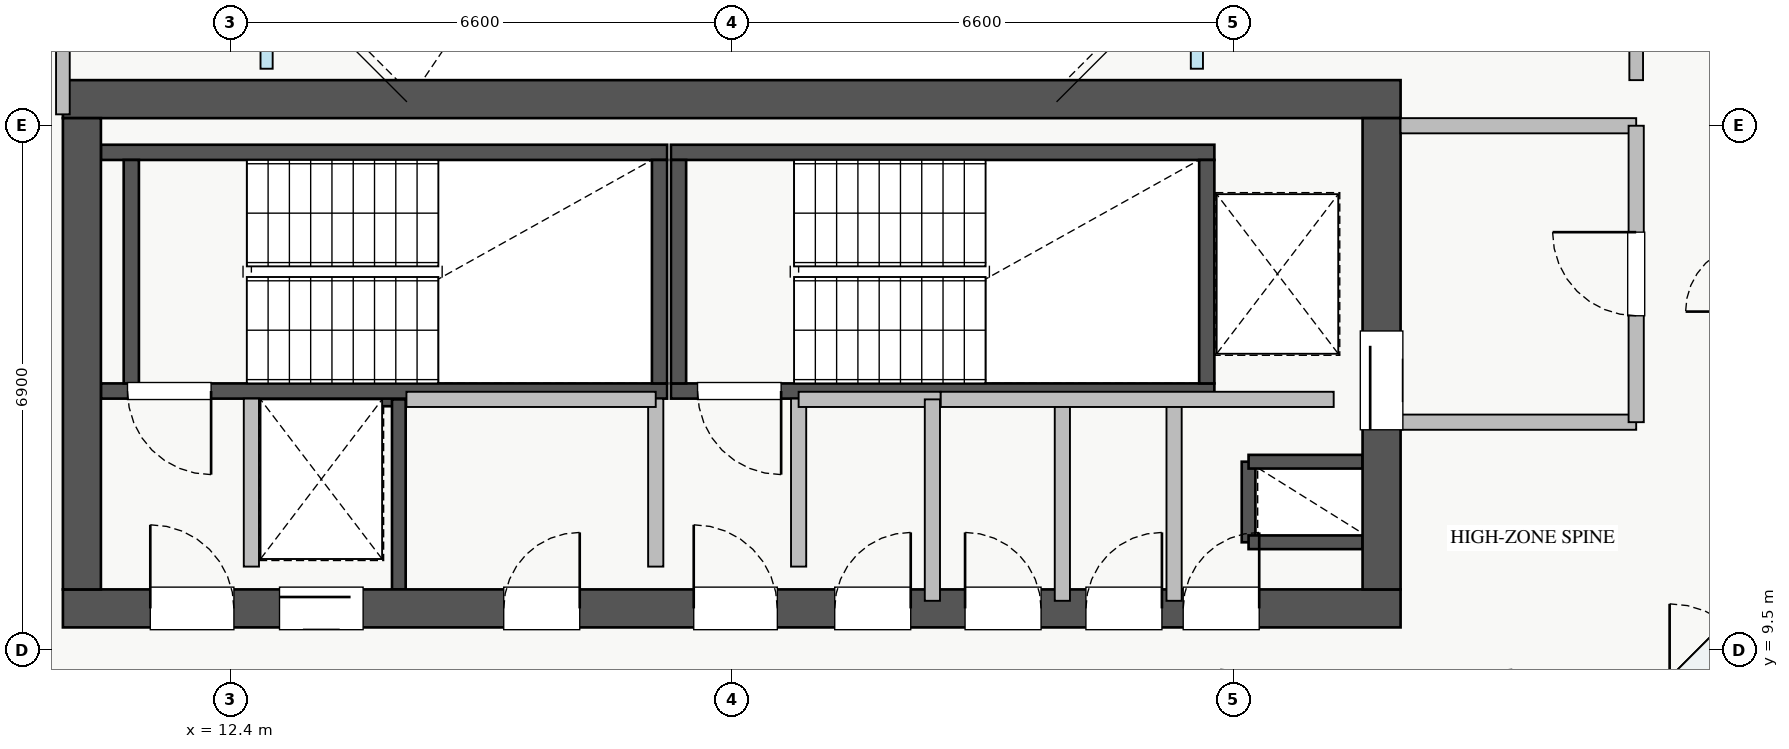
"""IFC4 building model, lengths in metres.
Left out: names, types, materials, properties, quantities, classifications, styles, units other than length and angle.
Written with IfcOpenShell. Run it as: python <this file> out.ifc"""

import sys

from ifc_helpers import new_model, si_unit, direction, frame, frame_2d, origin, place, context, subcontext, project, spatial, rectangle, extrude, source, transform, mapped, element, fill, save


model = new_model("IFC4")
c1 = context("Model", 3, precision=1e-05, world=origin(), true_north=direction((0.0, 1.0)))
c2 = subcontext(c1, "Body", "Model", "MODEL_VIEW")
j1 = project(units=[si_unit("LENGTHUNIT", "METRE"), si_unit("PLANEANGLEUNIT", "RADIAN")], contexts=[c1])
p1 = place(None, origin())
s1 = spatial("IfcSite", under=j1, at=p1, CompositionType="ELEMENT")
p2 = place(p1, origin())
s2 = spatial("IfcBuilding", under=s1, at=p2, CompositionType="ELEMENT")
p3 = place(p2, frame((0.0, 0.0, 213.25)))
s3 = spatial("IfcBuildingStorey", under=s2, at=p3, CompositionType="ELEMENT", Elevation=213.25)
p4 = place(p3, frame((12.68, 12.8, 0.0), z_axis=(0.0, 0.0, 1.0), x_axis=(1.0, 0.0, 0.0)))
e1 = element("IfcWall", 1, at=p4, inside=s3, PredefinedType="SHEAR", context=c2, shape_type="SweptSolid", body=[
    extrude(rectangle(XDim=1.94, YDim=0.18, at=frame_2d((0.97, 0.0))), origin(), (0.0, 0.0, 1.0), 3.07),
])
p5 = place(p3, frame((14.62, 10.3, 0.0), z_axis=(0.0, 0.0, 1.0), x_axis=(0.0, 1.0, 0.0)))
e2 = element("IfcWall", 2, at=p5, inside=s3, PredefinedType="SHEAR", context=c2, shape_type="SweptSolid", body=[
    extrude(rectangle(XDim=2.5, YDim=0.18, at=frame_2d((1.25, 0.0))), origin(), (0.0, 0.0, 1.0), 3.07),
])
p6 = place(p3, frame((25.8, 10.92, 0.0), z_axis=(0.0, 0.0, 1.0), x_axis=(0.0, 1.0, 0.0)))
e3 = element("IfcWall", 3, at=p6, inside=s3, PredefinedType="SHEAR", context=c2, shape_type="SweptSolid", body=[
    extrude(rectangle(XDim=1.06, YDim=0.18, at=frame_2d((0.53, 0.0))), origin(), (0.0, 0.0, 1.0), 3.07),
])
for number, where, z_axis, x_axis in (
    (4, (25.8, 11.98, 0.0), (0.0, 0.0, 1.0), (1.0, 0.0, 0.0)),
    (5, (25.8, 10.92, 0.0), (0.0, 0.0, 1.0), (1.0, 0.0, 0.0)),
):
    element("IfcWall", number, at=place(p3, frame(where, z_axis=z_axis, x_axis=x_axis)), inside=s3, PredefinedType="SHEAR", context=c2, shape_type="SweptSolid", body=[
        extrude(rectangle(XDim=1.5, YDim=0.18, at=frame_2d((0.75, 0.0))), origin(), (0.0, 0.0, 1.0), 3.07),
    ])
p7 = place(p3, frame((10.7, 12.91, 0.0), z_axis=(0.0, 0.0, 1.0), x_axis=(1.0, 0.0, 0.0)))
e6 = element("IfcWall", 6, at=p7, inside=s3, PredefinedType="SHEAR", context=c2, shape_type="SweptSolid", body=[
    extrude(rectangle(XDim=7.45, YDim=0.2, at=frame_2d((3.725, 0.0))), origin(), (0.0, 0.0, 1.0), 3.25),
])
p8 = place(p7, frame((0.35, 0.0, 0.0)))
e7 = element("IfcOpeningElement", 7, at=p8, cuts=e6, PredefinedType="OPENING", context=c2, shape_type="SweptSolid", body=[
    extrude(rectangle(XDim=1.1, YDim=2.05, at=frame_2d((0.55, 1.025))), frame((0.0, 0.11, 0.0), z_axis=(0.0, -1.0, 0.0), x_axis=(1.0, 0.0, 0.0)), (0.0, 0.0, 1.0), 0.22),
])
p9 = place(p3, frame((10.7, 16.05, 0.0), z_axis=(0.0, 0.0, 1.0), x_axis=(1.0, 0.0, 0.0)))
e8 = element("IfcWall", 8, at=p9, inside=s3, PredefinedType="SHEAR", context=c2, shape_type="SweptSolid", body=[
    extrude(rectangle(XDim=7.45, YDim=0.2, at=frame_2d((3.725, 0.0))), origin(), (0.0, 0.0, 1.0), 3.25),
])
for number, where, z_axis, x_axis in (
    (9, (11.1, 13.01, 0.0), (0.0, 0.0, 1.0), (0.0, 1.0, 0.0)),
    (10, (18.05, 13.01, 0.0), (0.0, 0.0, 1.0), (0.0, 1.0, 0.0)),
):
    element("IfcWall", number, at=place(p3, frame(where, z_axis=z_axis, x_axis=x_axis)), inside=s3, PredefinedType="SHEAR", context=c2, shape_type="SweptSolid", body=[
        extrude(rectangle(XDim=2.94, YDim=0.2, at=frame_2d((1.47, 0.0))), origin(), (0.0, 0.0, 1.0), 3.25),
    ])
p10 = place(p3, frame((18.2, 12.91, 0.0), z_axis=(0.0, 0.0, 1.0), x_axis=(1.0, 0.0, 0.0)))
e11 = element("IfcWall", 11, at=p10, inside=s3, PredefinedType="SHEAR", context=c2, shape_type="SweptSolid", body=[
    extrude(rectangle(XDim=7.15, YDim=0.2, at=frame_2d((3.575, 0.0))), origin(), (0.0, 0.0, 1.0), 3.25),
])
p11 = place(p10, frame((0.35, 0.0, 0.0)))
e12 = element("IfcOpeningElement", 12, at=p11, cuts=e11, PredefinedType="OPENING", context=c2, shape_type="SweptSolid", body=[
    extrude(rectangle(XDim=1.1, YDim=2.05, at=frame_2d((0.55, 1.025))), frame((0.0, 0.11, 0.0), z_axis=(0.0, -1.0, 0.0), x_axis=(1.0, 0.0, 0.0)), (0.0, 0.0, 1.0), 0.22),
])
p12 = place(p3, frame((18.2, 16.05, 0.0), z_axis=(0.0, 0.0, 1.0), x_axis=(1.0, 0.0, 0.0)))
e13 = element("IfcWall", 13, at=p12, inside=s3, PredefinedType="SHEAR", context=c2, shape_type="SweptSolid", body=[
    extrude(rectangle(XDim=7.15, YDim=0.2, at=frame_2d((3.575, 0.0))), origin(), (0.0, 0.0, 1.0), 3.25),
])
for number, where, z_axis, x_axis in (
    (14, (18.3, 13.01, 0.0), (0.0, 0.0, 1.0), (0.0, 1.0, 0.0)),
    (15, (25.25, 13.01, 0.0), (0.0, 0.0, 1.0), (0.0, 1.0, 0.0)),
):
    element("IfcWall", number, at=place(p3, frame(where, z_axis=z_axis, x_axis=x_axis)), inside=s3, PredefinedType="SHEAR", context=c2, shape_type="SweptSolid", body=[
        extrude(rectangle(XDim=2.94, YDim=0.2, at=frame_2d((1.47, 0.0))), origin(), (0.0, 0.0, 1.0), 3.25),
    ])
p13 = place(p3, frame((10.2, 10.05, 0.0), z_axis=(0.0, 0.0, 1.0), x_axis=(1.0, 0.0, 0.0)))
e16 = element("IfcWall", 16, at=p13, inside=s3, PredefinedType="SHEAR", context=c2, shape_type="SweptSolid", body=[
    extrude(rectangle(XDim=17.6, YDim=0.5, at=frame_2d((8.8, 0.0))), origin(), (0.0, 0.0, 1.0), 3.25),
])
p14 = place(p13, frame((1.15, 0.0, 0.0)))
e17 = element("IfcOpeningElement", 17, at=p14, cuts=e16, PredefinedType="OPENING", context=c2, shape_type="SweptSolid", body=[
    extrude(rectangle(XDim=1.1, YDim=2.05, at=frame_2d((0.55, 1.025))), frame((0.0, 0.26, 0.0), z_axis=(0.0, -1.0, 0.0), x_axis=(1.0, 0.0, 0.0)), (0.0, 0.0, 1.0), 0.52),
])
p15 = place(p13, frame((8.3, 0.0, 0.0)))
e18 = element("IfcOpeningElement", 18, at=p15, cuts=e16, PredefinedType="OPENING", context=c2, shape_type="SweptSolid", body=[
    extrude(rectangle(XDim=1.1, YDim=2.05, at=frame_2d((0.55, 1.025))), frame((0.0, 0.26, 0.0), z_axis=(0.0, -1.0, 0.0), x_axis=(1.0, 0.0, 0.0)), (0.0, 0.0, 1.0), 0.52),
])
p16 = place(p13, frame((2.85, 0.0, 0.0)))
e19 = element("IfcOpeningElement", 19, at=p16, cuts=e16, PredefinedType="OPENING", context=c2, shape_type="SweptSolid", body=[
    extrude(rectangle(XDim=1.1, YDim=2.05, at=frame_2d((0.55, 1.025))), frame((0.0, 0.26, 0.0), z_axis=(0.0, -1.0, 0.0), x_axis=(1.0, 0.0, 0.0)), (0.0, 0.0, 1.0), 0.52),
])
p17 = place(p13, frame((5.8, 0.0, 0.0)))
e20 = element("IfcOpeningElement", 20, at=p17, cuts=e16, PredefinedType="OPENING", context=c2, shape_type="SweptSolid", body=[
    extrude(rectangle(XDim=1.0, YDim=2.05, at=frame_2d((0.5, 1.025))), frame((0.0, 0.26, 0.0), z_axis=(0.0, -1.0, 0.0), x_axis=(1.0, 0.0, 0.0)), (0.0, 0.0, 1.0), 0.52),
])
p18 = place(p13, frame((14.74, 0.0, 0.0)))
e21 = element("IfcOpeningElement", 21, at=p18, cuts=e16, PredefinedType="OPENING", context=c2, shape_type="SweptSolid", body=[
    extrude(rectangle(XDim=1.0, YDim=2.05, at=frame_2d((0.5, 1.025))), frame((0.0, 0.26, 0.0), z_axis=(0.0, -1.0, 0.0), x_axis=(1.0, 0.0, 0.0)), (0.0, 0.0, 1.0), 0.52),
])
p19 = place(p13, frame((10.155, 0.0, 0.0)))
e22 = element("IfcOpeningElement", 22, at=p19, cuts=e16, PredefinedType="OPENING", context=c2, shape_type="SweptSolid", body=[
    extrude(rectangle(XDim=1.0, YDim=2.05, at=frame_2d((0.5, 1.025))), frame((0.0, 0.26, 0.0), z_axis=(0.0, -1.0, 0.0), x_axis=(1.0, 0.0, 0.0)), (0.0, 0.0, 1.0), 0.52),
])
p20 = place(p13, frame((11.87, 0.0, 0.0)))
e23 = element("IfcOpeningElement", 23, at=p20, cuts=e16, PredefinedType="OPENING", context=c2, shape_type="SweptSolid", body=[
    extrude(rectangle(XDim=1.0, YDim=2.05, at=frame_2d((0.5, 1.025))), frame((0.0, 0.26, 0.0), z_axis=(0.0, -1.0, 0.0), x_axis=(1.0, 0.0, 0.0)), (0.0, 0.0, 1.0), 0.52),
])
p21 = place(p13, frame((13.46, 0.0, 0.0)))
e24 = element("IfcOpeningElement", 24, at=p21, cuts=e16, PredefinedType="OPENING", context=c2, shape_type="SweptSolid", body=[
    extrude(rectangle(XDim=1.0, YDim=2.05, at=frame_2d((0.5, 1.025))), frame((0.0, 0.26, 0.0), z_axis=(0.0, -1.0, 0.0), x_axis=(1.0, 0.0, 0.0)), (0.0, 0.0, 1.0), 0.52),
])
p22 = place(p3, frame((10.2, 16.75, 0.0), z_axis=(0.0, 0.0, 1.0), x_axis=(1.0, 0.0, 0.0)))
e25 = element("IfcWall", 25, at=p22, inside=s3, PredefinedType="SHEAR", context=c2, shape_type="SweptSolid", body=[
    extrude(rectangle(XDim=17.6, YDim=0.5, at=frame_2d((8.8, 0.0))), origin(), (0.0, 0.0, 1.0), 3.25),
])
p23 = place(p3, frame((10.45, 10.3, 0.0), z_axis=(0.0, 0.0, 1.0), x_axis=(0.0, 1.0, 0.0)))
e26 = element("IfcWall", 26, at=p23, inside=s3, PredefinedType="SHEAR", context=c2, shape_type="SweptSolid", body=[
    extrude(rectangle(XDim=6.2, YDim=0.5, at=frame_2d((3.1, 0.0))), origin(), (0.0, 0.0, 1.0), 3.25),
])
p24 = place(p3, frame((27.55, 10.3, 0.0), z_axis=(0.0, 0.0, 1.0), x_axis=(0.0, 1.0, 0.0)))
e27 = element("IfcWall", 27, at=p24, inside=s3, PredefinedType="SHEAR", context=c2, shape_type="SweptSolid", body=[
    extrude(rectangle(XDim=6.2, YDim=0.5, at=frame_2d((3.1, 0.0))), origin(), (0.0, 0.0, 1.0), 3.25),
])
p25 = place(p24, frame((2.1, 0.0, 0.0)))
e28 = element("IfcOpeningElement", 28, at=p25, cuts=e27, PredefinedType="OPENING", context=c2, shape_type="SweptSolid", body=[
    extrude(rectangle(XDim=1.3, YDim=2.05, at=frame_2d((0.65, 1.025))), frame((0.0, 0.26, 0.0), z_axis=(0.0, -1.0, 0.0), x_axis=(1.0, 0.0, 0.0)), (0.0, 0.0, 1.0), 0.52),
])
p26 = place(p3, frame((27.8, 16.4, 0.0), z_axis=(0.0, 0.0, 1.0), x_axis=(1.0, 0.0, 0.0)))
e29 = element("IfcWall", 29, at=p26, inside=s3, PredefinedType="PARTITIONING", context=c2, shape_type="SweptSolid", body=[
    extrude(rectangle(XDim=3.1, YDim=0.2, at=frame_2d((1.55, 0.0))), origin(), (0.0, 0.0, 1.0), 3.07),
])
p27 = place(p3, frame((27.8, 12.5, 0.0), z_axis=(0.0, 0.0, 1.0), x_axis=(1.0, 0.0, 0.0)))
e30 = element("IfcWall", 30, at=p27, inside=s3, PredefinedType="PARTITIONING", context=c2, shape_type="SweptSolid", body=[
    extrude(rectangle(XDim=3.1, YDim=0.2, at=frame_2d((1.55, 0.0))), origin(), (0.0, 0.0, 1.0), 2.265),
])
p28 = place(p3, frame((30.9, 12.5, 0.0), z_axis=(0.0, 0.0, 1.0), x_axis=(0.0, 1.0, 0.0)))
e31 = element("IfcWall", 31, at=p28, inside=s3, PredefinedType="PARTITIONING", context=c2, shape_type="SweptSolid", body=[
    extrude(rectangle(XDim=3.9, YDim=0.2, at=frame_2d((1.95, 0.0))), origin(), (0.0, 0.0, 1.0), 3.07),
])
p29 = place(p28, frame((1.4, 0.0, 0.0)))
e32 = element("IfcOpeningElement", 32, at=p29, cuts=e31, PredefinedType="OPENING", context=c2, shape_type="SweptSolid", body=[
    extrude(rectangle(XDim=1.1, YDim=2.05, at=frame_2d((0.55, 1.025))), frame((0.0, 0.11, 0.0), z_axis=(0.0, -1.0, 0.0), x_axis=(1.0, 0.0, 0.0)), (0.0, 0.0, 1.0), 0.22),
])
for number, where, z_axis, x_axis in (
    (33, (12.68, 10.6, 0.0), (0.0, 0.0, 1.0), (0.0, 1.0, 0.0)),
    (34, (18.0, 10.6, 0.0), (0.0, 0.0, 1.0), (0.0, 1.0, 0.0)),
    (35, (19.88, 10.6, 0.0), (0.0, 0.0, 1.0), (0.0, 1.0, 0.0)),
):
    element("IfcWall", number, at=place(p3, frame(where, z_axis=z_axis, x_axis=x_axis)), inside=s3, PredefinedType="PARTITIONING", context=c2, shape_type="SweptSolid", body=[
        extrude(rectangle(XDim=2.21, YDim=0.2, at=frame_2d((1.105, 0.0))), origin(), (0.0, 0.0, 1.0), 3.07),
    ])
p30 = place(p3, frame((14.72, 12.8, 0.0), z_axis=(0.0, 0.0, 1.0), x_axis=(1.0, 0.0, 0.0)))
e36 = element("IfcWall", 36, at=p30, inside=s3, PredefinedType="PARTITIONING", context=c2, shape_type="SweptSolid", body=[
    extrude(rectangle(XDim=3.28, YDim=0.2, at=frame_2d((1.64, 0.0))), origin(), (0.0, 0.0, 1.0), 3.07),
])
p31 = place(p3, frame((24.82, 10.15, 0.0), z_axis=(0.0, 0.0, 1.0), x_axis=(0.0, 1.0, 0.0)))
e37 = element("IfcWall", 37, at=p31, inside=s3, PredefinedType="PARTITIONING", context=c2, shape_type="SweptSolid", body=[
    extrude(rectangle(XDim=2.65, YDim=0.2, at=frame_2d((1.325, 0.0))), origin(), (0.0, 0.0, 1.0), 3.07),
])
p32 = place(p3, frame((19.88, 12.8, 0.0), z_axis=(0.0, 0.0, 1.0), x_axis=(1.0, 0.0, 0.0)))
e38 = element("IfcWall", 38, at=p32, inside=s3, PredefinedType="PARTITIONING", context=c2, shape_type="SweptSolid", body=[
    extrude(rectangle(XDim=1.87, YDim=0.2, at=frame_2d((0.935, 0.0))), origin(), (0.0, 0.0, 1.0), 3.07),
])
for number, where, z_axis, x_axis in (
    (39, (21.64, 10.15, 0.0), (0.0, 0.0, 1.0), (0.0, 1.0, 0.0)),
    (40, (23.35, 10.15, 0.0), (0.0, 0.0, 1.0), (0.0, 1.0, 0.0)),
):
    element("IfcWall", number, at=place(p3, frame(where, z_axis=z_axis, x_axis=x_axis)), inside=s3, PredefinedType="PARTITIONING", context=c2, shape_type="SweptSolid", body=[
        extrude(rectangle(XDim=2.65, YDim=0.2, at=frame_2d((1.325, 0.0))), origin(), (0.0, 0.0, 1.0), 3.07),
    ])
p33 = place(p3, frame((21.75, 12.8, 0.0), z_axis=(0.0, 0.0, 1.0), x_axis=(1.0, 0.0, 0.0)))
e41 = element("IfcWall", 41, at=p33, inside=s3, PredefinedType="PARTITIONING", context=c2, shape_type="SweptSolid", body=[
    extrude(rectangle(XDim=5.17, YDim=0.2, at=frame_2d((2.585, 0.0))), origin(), (0.0, 0.0, 1.0), 3.07),
])
p34 = place(p3, frame((10.2, 16.55, 0.0), z_axis=(0.0, 0.0, 1.0), x_axis=(0.0, 1.0, 0.0)))
e42 = element("IfcWall", 42, at=p34, inside=s3, PredefinedType="PARTITIONING", context=c2, shape_type="SweptSolid", body=[
    extrude(rectangle(XDim=4.45, YDim=0.18, at=frame_2d((2.225, 0.0))), origin(), (0.0, 0.0, 1.0), 3.07),
])
p35 = place(p34, frame((2.025, 0.0, 0.0)))
e43 = element("IfcOpeningElement", 43, at=p35, cuts=e42, PredefinedType="OPENING", context=c2, shape_type="SweptSolid", body=[
    extrude(rectangle(XDim=0.85, YDim=2.05, at=frame_2d((0.425, 1.025))), frame((0.0, 0.1, 0.0), z_axis=(0.0, -1.0, 0.0), x_axis=(1.0, 0.0, 0.0)), (0.0, 0.0, 1.0), 0.2),
])
p36 = place(p3, frame((30.9, 17.0, 0.0), z_axis=(0.0, 0.0, 1.0), x_axis=(0.0, 1.0, 0.0)))
e44 = element("IfcWall", 44, at=p36, inside=s3, PredefinedType="PARTITIONING", context=c2, shape_type="SweptSolid", body=[
    extrude(rectangle(XDim=12.0, YDim=0.18, at=frame_2d((6.0, 0.0))), origin(), (0.0, 0.0, 1.0), 3.07),
])
p37 = place(p36, frame((1.5, 0.0, 0.0)))
e45 = element("IfcOpeningElement", 45, at=p37, cuts=e44, PredefinedType="OPENING", context=c2, shape_type="SweptSolid", body=[
    extrude(rectangle(XDim=1.0, YDim=2.05, at=frame_2d((0.5, 1.025))), frame((0.0, 0.1, 0.0), z_axis=(0.0, -1.0, 0.0), x_axis=(1.0, 0.0, 0.0)), (0.0, 0.0, 1.0), 0.2),
])
p38 = place(p36, frame((5.5, 0.0, 0.0)))
e46 = element("IfcOpeningElement", 46, at=p38, cuts=e44, PredefinedType="OPENING", context=c2, shape_type="SweptSolid", body=[
    extrude(rectangle(XDim=1.0, YDim=2.05, at=frame_2d((0.5, 1.025))), frame((0.0, 0.1, 0.0), z_axis=(0.0, -1.0, 0.0), x_axis=(1.0, 0.0, 0.0)), (0.0, 0.0, 1.0), 0.2),
])
p39 = place(p36, frame((9.5, 0.0, 0.0)))
e47 = element("IfcOpeningElement", 47, at=p39, cuts=e44, PredefinedType="OPENING", context=c2, shape_type="SweptSolid", body=[
    extrude(rectangle(XDim=1.0, YDim=2.05, at=frame_2d((0.5, 1.025))), frame((0.0, 0.1, 0.0), z_axis=(0.0, -1.0, 0.0), x_axis=(1.0, 0.0, 0.0)), (0.0, 0.0, 1.0), 0.2),
])
m1 = source(origin(), c2, "Body", "SweptSolid", [
    extrude(rectangle(XDim=1.3, YDim=2.05, at=frame_2d((0.65, 1.025))), frame((0.0, 0.025, 0.0), z_axis=(0.0, -1.0, 0.0), x_axis=(1.0, 0.0, 0.0)), (0.0, 0.0, 1.0), 0.05),
])
p40 = place(p25, origin())
e48 = element("IfcDoor", 48, at=p40, inside=s3, OperationType="SLIDING_TO_RIGHT", PredefinedType="DOOR", context=c2, shape_type="MappedRepresentation", body=[
    mapped(m1, transform((0.0, 0.0, 0.0), x_axis=(1.0, 0.0, 0.0), y_axis=(0.0, 1.0, 0.0), z_axis=(0.0, 0.0, 1.0), scale=1.0)),
])
fill(e28, e48)
m2 = source(origin(), c2, "Body", "SweptSolid", [
    extrude(rectangle(XDim=1.1, YDim=2.05, at=frame_2d((0.55, 1.025))), frame((0.0, 0.025, 0.0), z_axis=(0.0, -1.0, 0.0), x_axis=(1.0, 0.0, 0.0)), (0.0, 0.0, 1.0), 0.05),
])
p41 = place(p14, origin())
e49 = element("IfcDoor", 49, at=p41, inside=s3, OperationType="SINGLE_SWING_LEFT", PredefinedType="DOOR", context=c2, shape_type="MappedRepresentation", body=[
    mapped(m2, transform((0.0, 0.0, 0.0), x_axis=(1.0, 0.0, 0.0), y_axis=(0.0, 1.0, 0.0), z_axis=(0.0, 0.0, 1.0), scale=1.0)),
])
fill(e17, e49)
p42 = place(p8, frame((1.1, 0.0, 0.0), z_axis=(0.0, 0.0, 1.0), x_axis=(-1.0, 0.0, 0.0)))
e50 = element("IfcDoor", 50, at=p42, inside=s3, OperationType="SINGLE_SWING_RIGHT", PredefinedType="DOOR", context=c2, shape_type="MappedRepresentation", body=[
    mapped(m2, transform((0.0, 0.0, 0.0), x_axis=(1.0, 0.0, 0.0), y_axis=(0.0, 1.0, 0.0), z_axis=(0.0, 0.0, 1.0), scale=1.0)),
])
fill(e7, e50)
p43 = place(p15, origin())
e51 = element("IfcDoor", 51, at=p43, inside=s3, OperationType="SINGLE_SWING_LEFT", PredefinedType="DOOR", context=c2, shape_type="MappedRepresentation", body=[
    mapped(m2, transform((0.0, 0.0, 0.0), x_axis=(1.0, 0.0, 0.0), y_axis=(0.0, 1.0, 0.0), z_axis=(0.0, 0.0, 1.0), scale=1.0)),
])
fill(e18, e51)
p44 = place(p11, frame((1.1, 0.0, 0.0), z_axis=(0.0, 0.0, 1.0), x_axis=(-1.0, 0.0, 0.0)))
e52 = element("IfcDoor", 52, at=p44, inside=s3, OperationType="SINGLE_SWING_RIGHT", PredefinedType="DOOR", context=c2, shape_type="MappedRepresentation", body=[
    mapped(m2, transform((0.0, 0.0, 0.0), x_axis=(1.0, 0.0, 0.0), y_axis=(0.0, 1.0, 0.0), z_axis=(0.0, 0.0, 1.0), scale=1.0)),
])
fill(e12, e52)
p45 = place(p16, origin())
e53 = element("IfcDoor", 53, at=p45, inside=s3, OperationType="SLIDING_TO_RIGHT", PredefinedType="DOOR", context=c2, shape_type="MappedRepresentation", body=[
    mapped(m2, transform((0.0, 0.0, 0.0), x_axis=(1.0, 0.0, 0.0), y_axis=(0.0, 1.0, 0.0), z_axis=(0.0, 0.0, 1.0), scale=1.0)),
])
fill(e19, e53)
m3 = source(origin(), c2, "Body", "SweptSolid", [
    extrude(rectangle(XDim=1.0, YDim=2.05, at=frame_2d((0.5, 1.025))), frame((0.0, 0.025, 0.0), z_axis=(0.0, -1.0, 0.0), x_axis=(1.0, 0.0, 0.0)), (0.0, 0.0, 1.0), 0.05),
])
p46 = place(p17, origin())
e54 = element("IfcDoor", 54, at=p46, inside=s3, OperationType="SINGLE_SWING_RIGHT", PredefinedType="DOOR", context=c2, shape_type="MappedRepresentation", body=[
    mapped(m3, transform((0.0, 0.0, 0.0), x_axis=(1.0, 0.0, 0.0), y_axis=(0.0, 1.0, 0.0), z_axis=(0.0, 0.0, 1.0), scale=1.0)),
])
fill(e20, e54)
p47 = place(p18, origin())
e55 = element("IfcDoor", 55, at=p47, inside=s3, OperationType="SINGLE_SWING_RIGHT", PredefinedType="DOOR", context=c2, shape_type="MappedRepresentation", body=[
    mapped(m3, transform((0.0, 0.0, 0.0), x_axis=(1.0, 0.0, 0.0), y_axis=(0.0, 1.0, 0.0), z_axis=(0.0, 0.0, 1.0), scale=1.0)),
])
fill(e21, e55)
p48 = place(p19, origin())
e56 = element("IfcDoor", 56, at=p48, inside=s3, OperationType="SINGLE_SWING_RIGHT", PredefinedType="DOOR", context=c2, shape_type="MappedRepresentation", body=[
    mapped(m3, transform((0.0, 0.0, 0.0), x_axis=(1.0, 0.0, 0.0), y_axis=(0.0, 1.0, 0.0), z_axis=(0.0, 0.0, 1.0), scale=1.0)),
])
fill(e22, e56)
p49 = place(p20, origin())
e57 = element("IfcDoor", 57, at=p49, inside=s3, OperationType="SINGLE_SWING_LEFT", PredefinedType="DOOR", context=c2, shape_type="MappedRepresentation", body=[
    mapped(m3, transform((0.0, 0.0, 0.0), x_axis=(1.0, 0.0, 0.0), y_axis=(0.0, 1.0, 0.0), z_axis=(0.0, 0.0, 1.0), scale=1.0)),
])
fill(e23, e57)
p50 = place(p21, origin())
e58 = element("IfcDoor", 58, at=p50, inside=s3, OperationType="SINGLE_SWING_RIGHT", PredefinedType="DOOR", context=c2, shape_type="MappedRepresentation", body=[
    mapped(m3, transform((0.0, 0.0, 0.0), x_axis=(1.0, 0.0, 0.0), y_axis=(0.0, 1.0, 0.0), z_axis=(0.0, 0.0, 1.0), scale=1.0)),
])
fill(e24, e58)
p51 = place(p29, origin())
e59 = element("IfcDoor", 59, at=p51, inside=s3, OperationType="SINGLE_SWING_RIGHT", PredefinedType="DOOR", context=c2, shape_type="MappedRepresentation", body=[
    mapped(m2, transform((0.0, 0.0, 0.0), x_axis=(1.0, 0.0, 0.0), y_axis=(0.0, 1.0, 0.0), z_axis=(0.0, 0.0, 1.0), scale=1.0)),
])
fill(e32, e59)
save(model, sys.argv[1])
